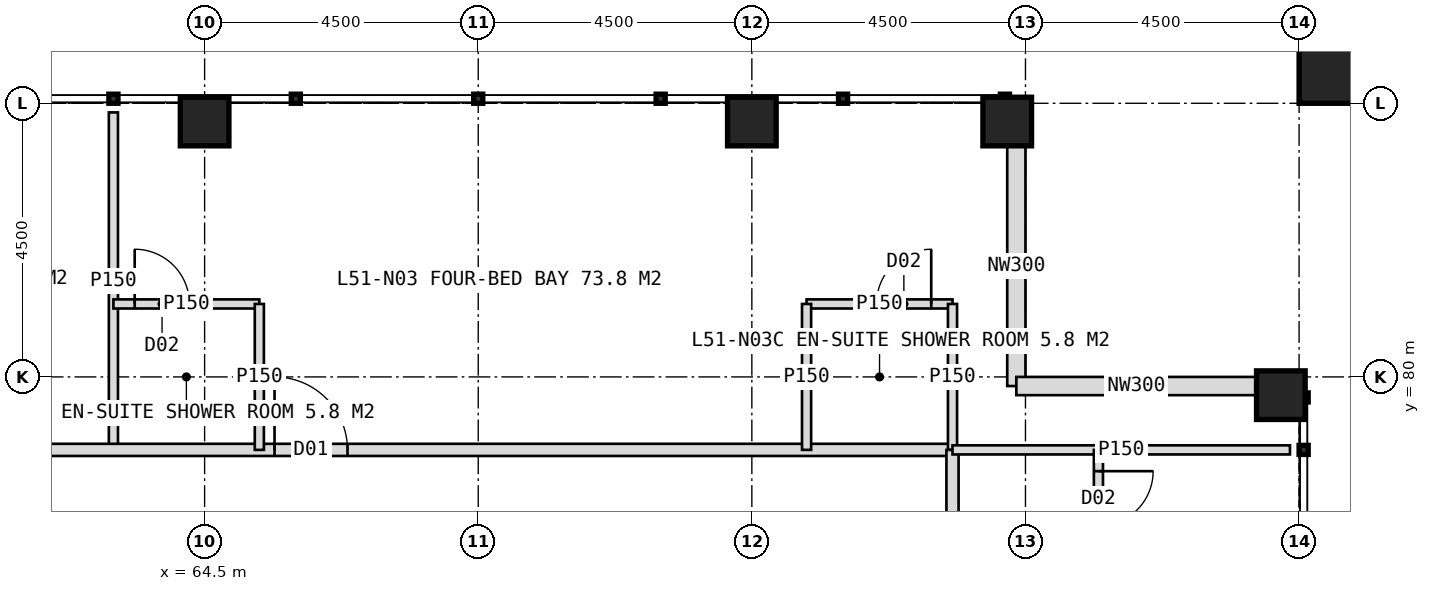
"""IFC4 building model, lengths in metres.
Left out: names, types, materials, properties, quantities, classifications, styles, units other than length and angle.
Written with IfcOpenShell. Run it as: python <this file> out.ifc"""

import sys

from ifc_helpers import new_model, si_unit, direction, frame, frame_2d, origin, origin_2d, place, context, subcontext, project, spatial, rectangle, hollow_rectangle, extrude, element, fill, save


model = new_model("IFC4")
c1 = context("Model", 3, precision=1e-05, world=origin(), true_north=direction((0.0, 1.0)))
c2 = subcontext(c1, "Body", "Model", "MODEL_VIEW")
j1 = project(units=[si_unit("LENGTHUNIT", "METRE"), si_unit("PLANEANGLEUNIT", "RADIAN")], contexts=[c1])
p1 = place(None, origin())
s1 = spatial("IfcSite", under=j1, at=p1, CompositionType="ELEMENT")
p2 = place(p1, origin())
s2 = spatial("IfcBuilding", under=s1, at=p2, CompositionType="ELEMENT")
p3 = place(p2, frame((0.0, 0.0, 213.0)))
s3 = spatial("IfcBuildingStorey", under=s2, at=p3, CompositionType="ELEMENT", Elevation=213.0)
for number, where, z_axis, x_axis in (
    (1, (64.5, 84.2, 0.0), (0.0, 0.0, 1.0), (1.0, 0.0, 0.0)),
    (2, (73.5, 84.2, 0.0), (0.0, 0.0, 1.0), (1.0, 0.0, 0.0)),
    (3, (77.7, 84.2, 0.0), (0.0, 0.0, 1.0), (1.0, 0.0, 0.0)),
    (4, (82.2, 79.7, 0.0), (0.0, 0.0, 1.0), (1.0, 0.0, 0.0)),
):
    element("IfcColumn", number, at=place(p3, frame(where, z_axis=z_axis, x_axis=x_axis)), inside=s3, PredefinedType="COLUMN", context=c2, shape_type="SweptSolid", body=[
        extrude(hollow_rectangle(XDim=0.8, YDim=0.8, WallThickness=0.08, at=origin_2d()), origin(), (0.0, 0.0, 1.0), 4.0),
    ])
p4 = place(p3, frame((83.1, 85.1, 0.0), z_axis=(0.0, 0.0, 1.0), x_axis=(1.0, 0.0, 0.0)))
e5 = element("IfcColumn", 5, at=p4, inside=s3, PredefinedType="COLUMN", context=c2, shape_type="SweptSolid", body=[
    extrude(hollow_rectangle(XDim=1.2, YDim=1.2, WallThickness=0.07, at=origin_2d()), origin(), (0.0, 0.0, 1.0), 4.0),
])
for number, where, z_axis, x_axis in (
    (6, (77.85, 83.8, 0.0), (0.0, 0.0, 1.0), (0.0, -1.0, 0.0)),
    (7, (77.85, 79.85, 0.0), (0.0, 0.0, 1.0), (1.0, 0.0, 0.0)),
):
    element("IfcWall", number, at=place(p3, frame(where, z_axis=z_axis, x_axis=x_axis)), inside=s3, PredefinedType="ELEMENTEDWALL", context=c2, shape_type="SweptSolid", body=[
        extrude(rectangle(XDim=3.95, YDim=0.3, at=frame_2d((1.975, 0.0))), origin(), (0.0, 0.0, 1.0), 2.85),
    ])
p5 = place(p3, frame((63.0, 78.8, 0.0), z_axis=(0.0, 0.0, 1.0), x_axis=(0.0, 1.0, 0.0)))
e8 = element("IfcWall", 8, at=p5, inside=s3, PredefinedType="PARTITIONING", context=c2, shape_type="SweptSolid", body=[
    extrude(rectangle(XDim=5.55, YDim=0.15, at=frame_2d((2.775, 0.0))), origin(), (0.0, 0.0, 1.0), 3.75),
])
p6 = place(p3, frame((43.2, 78.8, 0.0), z_axis=(0.0, 0.0, 1.0), x_axis=(1.0, 0.0, 0.0)))
e9 = element("IfcWall", 9, at=p6, inside=s3, PredefinedType="PARTITIONING", context=c2, shape_type="SweptSolid", body=[
    extrude(rectangle(XDim=33.6, YDim=0.2, at=frame_2d((16.8, 0.0))), origin(), (0.0, 0.0, 1.0), 3.75),
])
p7 = place(p6, frame((4.9, 0.0, 0.0)))
e10 = element("IfcOpeningElement", 10, at=p7, cuts=e9, PredefinedType="OPENING", context=c2, shape_type="SweptSolid", body=[
    extrude(rectangle(XDim=1.0, YDim=2.1, at=frame_2d((0.5, 1.05))), frame((0.0, 0.11, 0.0), z_axis=(0.0, -1.0, 0.0), x_axis=(1.0, 0.0, 0.0)), (0.0, 0.0, 1.0), 0.22),
])
p8 = place(p6, frame((14.05, 0.0, 0.0)))
e11 = element("IfcOpeningElement", 11, at=p8, cuts=e9, PredefinedType="OPENING", context=c2, shape_type="SweptSolid", body=[
    extrude(rectangle(XDim=1.2, YDim=2.2, at=frame_2d((0.6, 1.1))), frame((0.0, 0.11, 0.0), z_axis=(0.0, -1.0, 0.0), x_axis=(1.0, 0.0, 0.0)), (0.0, 0.0, 1.0), 0.22),
])
p9 = place(p6, frame((22.45, 0.0, 0.0)))
e12 = element("IfcOpeningElement", 12, at=p9, cuts=e9, PredefinedType="OPENING", context=c2, shape_type="SweptSolid", body=[
    extrude(rectangle(XDim=1.2, YDim=2.2, at=frame_2d((0.6, 1.1))), frame((0.0, 0.11, 0.0), z_axis=(0.0, -1.0, 0.0), x_axis=(1.0, 0.0, 0.0)), (0.0, 0.0, 1.0), 0.22),
])
p10 = place(p3, frame((63.0, 81.2, 0.0), z_axis=(0.0, 0.0, 1.0), x_axis=(1.0, 0.0, 0.0)))
e13 = element("IfcWall", 13, at=p10, inside=s3, PredefinedType="PARTITIONING", context=c2, shape_type="SweptSolid", body=[
    extrude(rectangle(XDim=2.4, YDim=0.15, at=frame_2d((1.2, 0.0))), origin(), (0.0, 0.0, 1.0), 3.75),
])
p11 = place(p10, frame((0.35, 0.0, 0.0)))
e14 = element("IfcOpeningElement", 14, at=p11, cuts=e13, PredefinedType="OPENING", context=c2, shape_type="SweptSolid", body=[
    extrude(rectangle(XDim=0.9, YDim=2.1, at=frame_2d((0.45, 1.05))), frame((0.0, 0.085, 0.0), z_axis=(0.0, -1.0, 0.0), x_axis=(1.0, 0.0, 0.0)), (0.0, 0.0, 1.0), 0.17),
])
p12 = place(p3, frame((65.4, 78.8, 0.0), z_axis=(0.0, 0.0, 1.0), x_axis=(0.0, 1.0, 0.0)))
e15 = element("IfcWall", 15, at=p12, inside=s3, PredefinedType="PARTITIONING", context=c2, shape_type="SweptSolid", body=[
    extrude(rectangle(XDim=2.4, YDim=0.15, at=frame_2d((1.2, 0.0))), origin(), (0.0, 0.0, 1.0), 3.75),
])
p13 = place(p3, frame((74.4, 81.2, 0.0), z_axis=(0.0, 0.0, 1.0), x_axis=(1.0, 0.0, 0.0)))
e16 = element("IfcWall", 16, at=p13, inside=s3, PredefinedType="PARTITIONING", context=c2, shape_type="SweptSolid", body=[
    extrude(rectangle(XDim=2.4, YDim=0.15, at=frame_2d((1.2, 0.0))), origin(), (0.0, 0.0, 1.0), 3.75),
])
p14 = place(p13, frame((1.15, 0.0, 0.0)))
e17 = element("IfcOpeningElement", 17, at=p14, cuts=e16, PredefinedType="OPENING", context=c2, shape_type="SweptSolid", body=[
    extrude(rectangle(XDim=0.9, YDim=2.1, at=frame_2d((0.45, 1.05))), frame((0.0, 0.085, 0.0), z_axis=(0.0, -1.0, 0.0), x_axis=(1.0, 0.0, 0.0)), (0.0, 0.0, 1.0), 0.17),
])
for number, where, z_axis, x_axis in (
    (18, (74.4, 78.8, 0.0), (0.0, 0.0, 1.0), (0.0, 1.0, 0.0)),
    (19, (76.8, 78.8, 0.0), (0.0, 0.0, 1.0), (0.0, 1.0, 0.0)),
):
    element("IfcWall", number, at=place(p3, frame(where, z_axis=z_axis, x_axis=x_axis)), inside=s3, PredefinedType="PARTITIONING", context=c2, shape_type="SweptSolid", body=[
        extrude(rectangle(XDim=2.4, YDim=0.15, at=frame_2d((1.2, 0.0))), origin(), (0.0, 0.0, 1.0), 3.75),
    ])
p15 = place(p3, frame((76.8, 78.8, 0.0), z_axis=(0.0, 0.0, 1.0), x_axis=(0.0, -1.0, 0.0)))
e20 = element("IfcWall", 20, at=p15, inside=s3, PredefinedType="PARTITIONING", context=c2, shape_type="SweptSolid", body=[
    extrude(rectangle(XDim=33.6, YDim=0.2, at=frame_2d((16.8, 0.0))), origin(), (0.0, 0.0, 1.0), 3.75),
])
p16 = place(p15, frame((3.25, 0.0, 0.0)))
e21 = element("IfcOpeningElement", 21, at=p16, cuts=e20, PredefinedType="OPENING", context=c2, shape_type="SweptSolid", body=[
    extrude(rectangle(XDim=1.2, YDim=2.2, at=frame_2d((0.6, 1.1))), frame((0.0, 0.11, 0.0), z_axis=(0.0, -1.0, 0.0), x_axis=(1.0, 0.0, 0.0)), (0.0, 0.0, 1.0), 0.22),
])
p17 = place(p15, frame((10.45, 0.0, 0.0)))
e22 = element("IfcOpeningElement", 22, at=p17, cuts=e20, PredefinedType="OPENING", context=c2, shape_type="SweptSolid", body=[
    extrude(rectangle(XDim=1.2, YDim=2.2, at=frame_2d((0.6, 1.1))), frame((0.0, 0.11, 0.0), z_axis=(0.0, -1.0, 0.0), x_axis=(1.0, 0.0, 0.0)), (0.0, 0.0, 1.0), 0.22),
])
p18 = place(p15, frame((14.8, 0.0, 0.0)))
e23 = element("IfcOpeningElement", 23, at=p18, cuts=e20, PredefinedType="OPENING", context=c2, shape_type="SweptSolid", body=[
    extrude(rectangle(XDim=1.0, YDim=2.1, at=frame_2d((0.5, 1.05))), frame((0.0, 0.11, 0.0), z_axis=(0.0, -1.0, 0.0), x_axis=(1.0, 0.0, 0.0)), (0.0, 0.0, 1.0), 0.22),
])
p19 = place(p15, frame((20.05, 0.0, 0.0)))
e24 = element("IfcOpeningElement", 24, at=p19, cuts=e20, PredefinedType="OPENING", context=c2, shape_type="SweptSolid", body=[
    extrude(rectangle(XDim=1.2, YDim=2.2, at=frame_2d((0.6, 1.1))), frame((0.0, 0.11, 0.0), z_axis=(0.0, -1.0, 0.0), x_axis=(1.0, 0.0, 0.0)), (0.0, 0.0, 1.0), 0.22),
])
p20 = place(p15, frame((26.95, 0.0, 0.0)))
e25 = element("IfcOpeningElement", 25, at=p20, cuts=e20, PredefinedType="OPENING", context=c2, shape_type="SweptSolid", body=[
    extrude(rectangle(XDim=1.2, YDim=2.2, at=frame_2d((0.6, 1.1))), frame((0.0, 0.11, 0.0), z_axis=(0.0, -1.0, 0.0), x_axis=(1.0, 0.0, 0.0)), (0.0, 0.0, 1.0), 0.22),
])
p21 = place(p3, frame((76.8, 78.8, 0.0), z_axis=(0.0, 0.0, 1.0), x_axis=(1.0, 0.0, 0.0)))
e26 = element("IfcWall", 26, at=p21, inside=s3, PredefinedType="PARTITIONING", context=c2, shape_type="SweptSolid", body=[
    extrude(rectangle(XDim=5.55, YDim=0.15, at=frame_2d((2.775, 0.0))), origin(), (0.0, 0.0, 1.0), 3.75),
])
p22 = place(p3, frame((79.2, 78.8, 0.0), z_axis=(0.0, 0.0, 1.0), x_axis=(0.0, -1.0, 0.0)))
e27 = element("IfcWall", 27, at=p22, inside=s3, PredefinedType="PARTITIONING", context=c2, shape_type="SweptSolid", body=[
    extrude(rectangle(XDim=3.0, YDim=0.15, at=frame_2d((1.5, 0.0))), origin(), (0.0, 0.0, 1.0), 3.75),
])
p23 = place(p22, frame((0.35, 0.0, 0.0)))
e28 = element("IfcOpeningElement", 28, at=p23, cuts=e27, PredefinedType="OPENING", context=c2, shape_type="SweptSolid", body=[
    extrude(rectangle(XDim=0.9, YDim=2.1, at=frame_2d((0.45, 1.05))), frame((0.0, 0.085, 0.0), z_axis=(0.0, -1.0, 0.0), x_axis=(1.0, 0.0, 0.0)), (0.0, 0.0, 1.0), 0.17),
])
p24 = place(p9, origin())
e29 = element("IfcDoor", 29, at=p24, inside=s3, OperationType="SINGLE_SWING_LEFT", PredefinedType="DOOR", context=c2, shape_type="SweptSolid", body=[
    extrude(rectangle(XDim=1.2, YDim=2.2, at=frame_2d((0.6, 1.1))), frame((0.0, 0.025, 0.0), z_axis=(0.0, -1.0, 0.0), x_axis=(1.0, 0.0, 0.0)), (0.0, 0.0, 1.0), 0.05),
])
fill(e12, e29)
p25 = place(p11, origin())
e30 = element("IfcDoor", 30, at=p25, inside=s3, OperationType="SINGLE_SWING_LEFT", PredefinedType="DOOR", context=c2, shape_type="SweptSolid", body=[
    extrude(rectangle(XDim=0.9, YDim=2.1, at=frame_2d((0.45, 1.05))), frame((0.0, 0.025, 0.0), z_axis=(0.0, -1.0, 0.0), x_axis=(1.0, 0.0, 0.0)), (0.0, 0.0, 1.0), 0.05),
])
fill(e14, e30)
p26 = place(p14, origin())
e31 = element("IfcDoor", 31, at=p26, inside=s3, OperationType="SINGLE_SWING_RIGHT", PredefinedType="DOOR", context=c2, shape_type="SweptSolid", body=[
    extrude(rectangle(XDim=0.9, YDim=2.1, at=frame_2d((0.45, 1.05))), frame((0.0, 0.025, 0.0), z_axis=(0.0, -1.0, 0.0), x_axis=(1.0, 0.0, 0.0)), (0.0, 0.0, 1.0), 0.05),
])
fill(e17, e31)
p27 = place(p23, origin())
e32 = element("IfcDoor", 32, at=p27, inside=s3, OperationType="SINGLE_SWING_LEFT", PredefinedType="DOOR", context=c2, shape_type="SweptSolid", body=[
    extrude(rectangle(XDim=0.9, YDim=2.1, at=frame_2d((0.45, 1.05))), frame((0.0, 0.025, 0.0), z_axis=(0.0, -1.0, 0.0), x_axis=(1.0, 0.0, 0.0)), (0.0, 0.0, 1.0), 0.05),
])
fill(e28, e32)
save(model, sys.argv[1])
